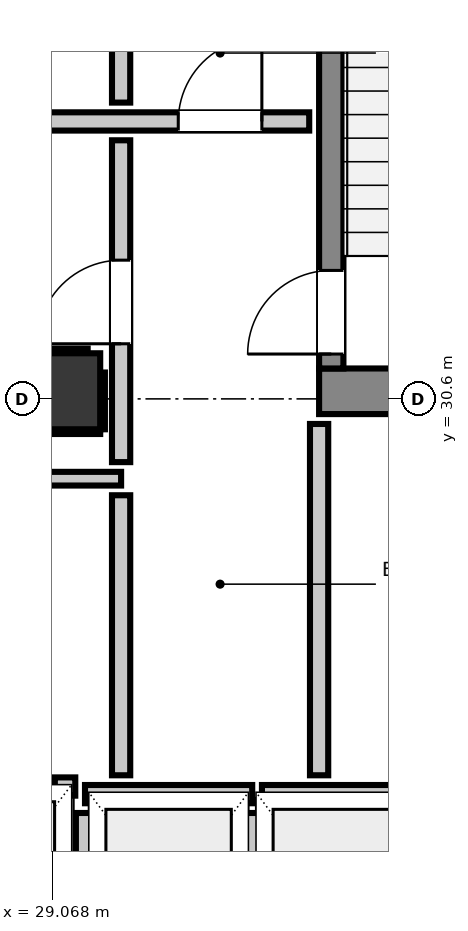
"""IFC4 building model, lengths in metres.
Left out: names, types, materials, properties, quantities, classifications, styles, units other than length and angle.
Written with IfcOpenShell. Run it as: python <this file> out.ifc"""

import sys

from ifc_helpers import new_model, si_unit, direction, frame, frame_2d, origin, origin_2d, place, context, subcontext, project, spatial, rectangle, extrude, element, fill, save


model = new_model("IFC4")
c1 = context("Model", 3, precision=1e-05, world=origin(), true_north=direction((0.0, 1.0)))
c2 = subcontext(c1, "Body", "Model", "MODEL_VIEW")
j1 = project(units=[si_unit("LENGTHUNIT", "METRE"), si_unit("PLANEANGLEUNIT", "RADIAN")], contexts=[c1])
p1 = place(None, origin())
s1 = spatial("IfcSite", under=j1, at=p1, CompositionType="ELEMENT")
p2 = place(p1, origin())
s2 = spatial("IfcBuilding", under=s1, at=p2, CompositionType="ELEMENT")
p3 = place(p2, frame((0.0, 0.0, 92.8)))
s3 = spatial("IfcBuildingStorey", under=s2, at=p3, CompositionType="ELEMENT", Elevation=92.8)
p4 = place(p3, frame((32.58, 30.7, 0.0), z_axis=(0.0, 0.0, 1.0), x_axis=(1.0, 0.0, 0.0)))
e1 = element("IfcWall", 1, at=p4, inside=s3, PredefinedType="SHEAR", context=c2, shape_type="SweptSolid", body=[
    extrude(rectangle(XDim=3.415, YDim=0.6, at=frame_2d((1.708, 0.0))), origin(), (0.0, 0.0, 1.0), 3.32),
])
p5 = place(p3, frame((32.74, 31.0, 0.0), z_axis=(0.0, 0.0, 1.0), x_axis=(0.0, 1.0, 0.0)))
e2 = element("IfcWall", 2, at=p5, inside=s3, PredefinedType="SHEAR", context=c2, shape_type="SweptSolid", body=[
    extrude(rectangle(XDim=7.8, YDim=0.32, at=frame_2d((3.9, 0.0))), origin(), (0.0, 0.0, 1.0), 3.32),
])
p6 = place(p5, frame((0.19, 0.0, 0.0)))
e3 = element("IfcOpeningElement", 3, at=p6, cuts=e2, PredefinedType="OPENING", context=c2, shape_type="SweptSolid", body=[
    extrude(rectangle(XDim=1.1, YDim=2.15, at=frame_2d((0.55, 1.075))), frame((0.0, 0.17, 0.0), z_axis=(0.0, -1.0, 0.0), x_axis=(1.0, 0.0, 0.0)), (0.0, 0.0, 1.0), 0.34),
])
p7 = place(p3, frame((29.2, 30.7, 0.0), z_axis=(0.0, 0.0, 1.0), x_axis=(1.0, 0.0, 0.0)))
e4 = element("IfcColumn", 4, at=p7, inside=s3, PredefinedType="COLUMN", context=c2, shape_type="SweptSolid", body=[
    extrude(rectangle(XDim=1.0, YDim=1.0, at=origin_2d()), origin(), (0.0, 0.0, 1.0), 3.32),
])
p8 = place(p3, frame((29.5, 25.4, 0.0), z_axis=(0.0, 0.0, 1.0), x_axis=(1.0, 0.0, 0.0)))
e5 = element("IfcWall", 5, at=p8, inside=s3, PredefinedType="PARTITIONING", context=c2, shape_type="SweptSolid", body=[
    extrude(rectangle(XDim=2.2, YDim=0.24, at=frame_2d((1.1, 0.0))), origin(), (0.0, 0.0, 1.0), 3.06),
])
p9 = place(p3, frame((29.5, 22.632, 0.0), z_axis=(0.0, 0.0, 1.0), x_axis=(0.0, 1.0, 0.0)))
e6 = element("IfcWall", 6, at=p9, inside=s3, PredefinedType="PARTITIONING", context=c2, shape_type="SweptSolid", body=[
    extrude(rectangle(XDim=2.52, YDim=0.24, at=frame_2d((1.26, 0.0))), origin(), (0.0, 0.0, 1.0), 2.295),
])
p10 = place(p3, frame((31.7, 22.63, 0.0), z_axis=(0.0, 0.0, 1.0), x_axis=(0.0, 1.0, 0.0)))
e7 = element("IfcWall", 7, at=p10, inside=s3, PredefinedType="PARTITIONING", context=c2, shape_type="SweptSolid", body=[
    extrude(rectangle(XDim=2.522, YDim=0.24, at=frame_2d((1.261, 0.0))), origin(), (0.0, 0.0, 1.0), 3.06),
])
p11 = place(p3, frame((31.828, 25.4, 0.0), z_axis=(0.0, 0.0, 1.0), x_axis=(1.0, 0.0, 0.0)))
e8 = element("IfcWall", 8, at=p11, inside=s3, PredefinedType="PARTITIONING", context=c2, shape_type="SweptSolid", body=[
    extrude(rectangle(XDim=2.072, YDim=0.24, at=frame_2d((1.036, 0.0))), origin(), (0.0, 0.0, 1.0), 3.06),
])
p12 = place(p3, frame((29.103, 25.5, 0.0), z_axis=(0.0, 0.0, 1.0), x_axis=(1.0, 0.0, 0.0)))
e9 = element("IfcWall", 9, at=p12, inside=s3, PredefinedType="PARTITIONING", context=c2, shape_type="SweptSolid", body=[
    extrude(rectangle(XDim=0.269, YDim=0.24, at=frame_2d((0.135, 0.0))), origin(), (0.0, 0.0, 1.0), 3.06),
])
p13 = place(p3, frame((28.702, 34.25, 0.0), z_axis=(0.0, 0.0, 1.0), x_axis=(1.0, 0.0, 0.0)))
e10 = element("IfcWall", 10, at=p13, inside=s3, PredefinedType="PARTITIONING", context=c2, shape_type="SweptSolid", body=[
    extrude(rectangle(XDim=3.748, YDim=0.24, at=frame_2d((1.874, 0.0))), origin(), (0.0, 0.0, 1.0), 3.06),
])
p14 = place(p13, frame((2.025, 0.0, 0.0)))
e11 = element("IfcOpeningElement", 11, at=p14, cuts=e10, PredefinedType="OPENING", context=c2, shape_type="SweptSolid", body=[
    extrude(rectangle(XDim=1.1, YDim=2.15, at=frame_2d((0.55, 1.075))), frame((0.0, 0.13, 0.0), z_axis=(0.0, -1.0, 0.0), x_axis=(1.0, 0.0, 0.0)), (0.0, 0.0, 1.0), 0.26),
])
p15 = place(p3, frame((20.65, 29.55, 0.0), z_axis=(0.0, 0.0, 1.0), x_axis=(1.0, 0.0, 0.0)))
e12 = element("IfcWall", 12, at=p15, inside=s3, PredefinedType="PARTITIONING", context=c2, shape_type="SweptSolid", body=[
    extrude(rectangle(XDim=9.325, YDim=0.18, at=frame_2d((4.663, 0.0))), origin(), (0.0, 0.0, 1.0), 3.06),
])
p16 = place(p3, frame((29.975, 25.648, 0.0), z_axis=(0.0, 0.0, 1.0), x_axis=(0.0, 1.0, 0.0)))
e13 = element("IfcWall", 13, at=p16, inside=s3, PredefinedType="PARTITIONING", context=c2, shape_type="SweptSolid", body=[
    extrude(rectangle(XDim=3.684, YDim=0.24, at=frame_2d((1.842, 0.0))), origin(), (0.0, 0.0, 1.0), 3.06),
])
p17 = place(p3, frame((29.975, 29.768, 0.0), z_axis=(0.0, 0.0, 1.0), x_axis=(0.0, 1.0, 0.0)))
e14 = element("IfcWall", 14, at=p17, inside=s3, PredefinedType="PARTITIONING", context=c2, shape_type="SweptSolid", body=[
    extrude(rectangle(XDim=4.234, YDim=0.24, at=frame_2d((2.117, 0.0))), origin(), (0.0, 0.0, 1.0), 3.06),
])
p18 = place(p17, frame((1.557, 0.0, 0.0)))
e15 = element("IfcOpeningElement", 15, at=p18, cuts=e14, PredefinedType="OPENING", context=c2, shape_type="SweptSolid", body=[
    extrude(rectangle(XDim=1.1, YDim=2.15, at=frame_2d((0.55, 1.075))), frame((0.0, 0.13, 0.0), z_axis=(0.0, -1.0, 0.0), x_axis=(1.0, 0.0, 0.0)), (0.0, 0.0, 1.0), 0.26),
])
p19 = place(p3, frame((29.975, 34.498, 0.0), z_axis=(0.0, 0.0, 1.0), x_axis=(0.0, 1.0, 0.0)))
e16 = element("IfcWall", 16, at=p19, inside=s3, PredefinedType="PARTITIONING", context=c2, shape_type="SweptSolid", body=[
    extrude(rectangle(XDim=0.924, YDim=0.24, at=frame_2d((0.462, 0.0))), origin(), (0.0, 0.0, 1.0), 3.06),
])
p20 = place(p3, frame((32.58, 25.648, 0.0), z_axis=(0.0, 0.0, 1.0), x_axis=(0.0, 1.0, 0.0)))
e17 = element("IfcWall", 17, at=p20, inside=s3, PredefinedType="PARTITIONING", context=c2, shape_type="SweptSolid", body=[
    extrude(rectangle(XDim=4.622, YDim=0.24, at=frame_2d((2.311, 0.0))), origin(), (0.0, 0.0, 1.0), 3.06),
])
p21 = place(p3, frame((28.7, 30.168, 0.0), z_axis=(0.0, 0.0, 1.0), x_axis=(1.0, 0.0, 0.0)))
e18 = element("IfcWall", 18, at=p21, inside=s3, PredefinedType="PARTITIONING", context=c2, shape_type="SweptSolid", body=[
    extrude(rectangle(XDim=1.0, YDim=0.06, at=frame_2d((0.5, 0.0))), origin(), (0.0, 0.0, 1.0), 1.45),
])
p22 = place(p3, frame((28.7, 31.232, 0.0), z_axis=(0.0, 0.0, 1.0), x_axis=(1.0, 0.0, 0.0)))
e19 = element("IfcWall", 19, at=p22, inside=s3, PredefinedType="PARTITIONING", context=c2, shape_type="SweptSolid", body=[
    extrude(rectangle(XDim=0.835, YDim=0.06, at=frame_2d((0.417, 0.0))), origin(), (0.0, 0.0, 1.0), 1.45),
])
p23 = place(p3, frame((29.732, 30.2, 0.0), z_axis=(0.0, 0.0, 1.0), x_axis=(0.0, 1.0, 0.0)))
e20 = element("IfcWall", 20, at=p23, inside=s3, PredefinedType="PARTITIONING", context=c2, shape_type="SweptSolid", body=[
    extrude(rectangle(XDim=0.747, YDim=0.06, at=frame_2d((0.374, 0.0))), origin(), (0.0, 0.0, 1.0), 1.45),
])
p24 = place(p6, origin())
e21 = element("IfcDoor", 21, at=p24, inside=s3, OperationType="SINGLE_SWING_LEFT", PredefinedType="DOOR", context=c2, shape_type="SweptSolid", body=[
    extrude(rectangle(XDim=1.1, YDim=2.15, at=frame_2d((0.55, 1.075))), frame((0.0, 0.025, 0.0), z_axis=(0.0, -1.0, 0.0), x_axis=(1.0, 0.0, 0.0)), (0.0, 0.0, 1.0), 0.05),
])
fill(e3, e21)
p25 = place(p18, origin())
e22 = element("IfcDoor", 22, at=p25, inside=s3, OperationType="SINGLE_SWING_LEFT", PredefinedType="DOOR", context=c2, shape_type="SweptSolid", body=[
    extrude(rectangle(XDim=1.1, YDim=2.15, at=frame_2d((0.55, 1.075))), frame((0.0, 0.025, 0.0), z_axis=(0.0, -1.0, 0.0), x_axis=(1.0, 0.0, 0.0)), (0.0, 0.0, 1.0), 0.05),
])
fill(e15, e22)
p26 = place(p14, origin())
e23 = element("IfcDoor", 23, at=p26, inside=s3, OperationType="SINGLE_SWING_RIGHT", PredefinedType="DOOR", context=c2, shape_type="SweptSolid", body=[
    extrude(rectangle(XDim=1.1, YDim=2.15, at=frame_2d((0.55, 1.075))), frame((0.0, 0.025, 0.0), z_axis=(0.0, -1.0, 0.0), x_axis=(1.0, 0.0, 0.0)), (0.0, 0.0, 1.0), 0.05),
])
fill(e11, e23)
save(model, sys.argv[1])
